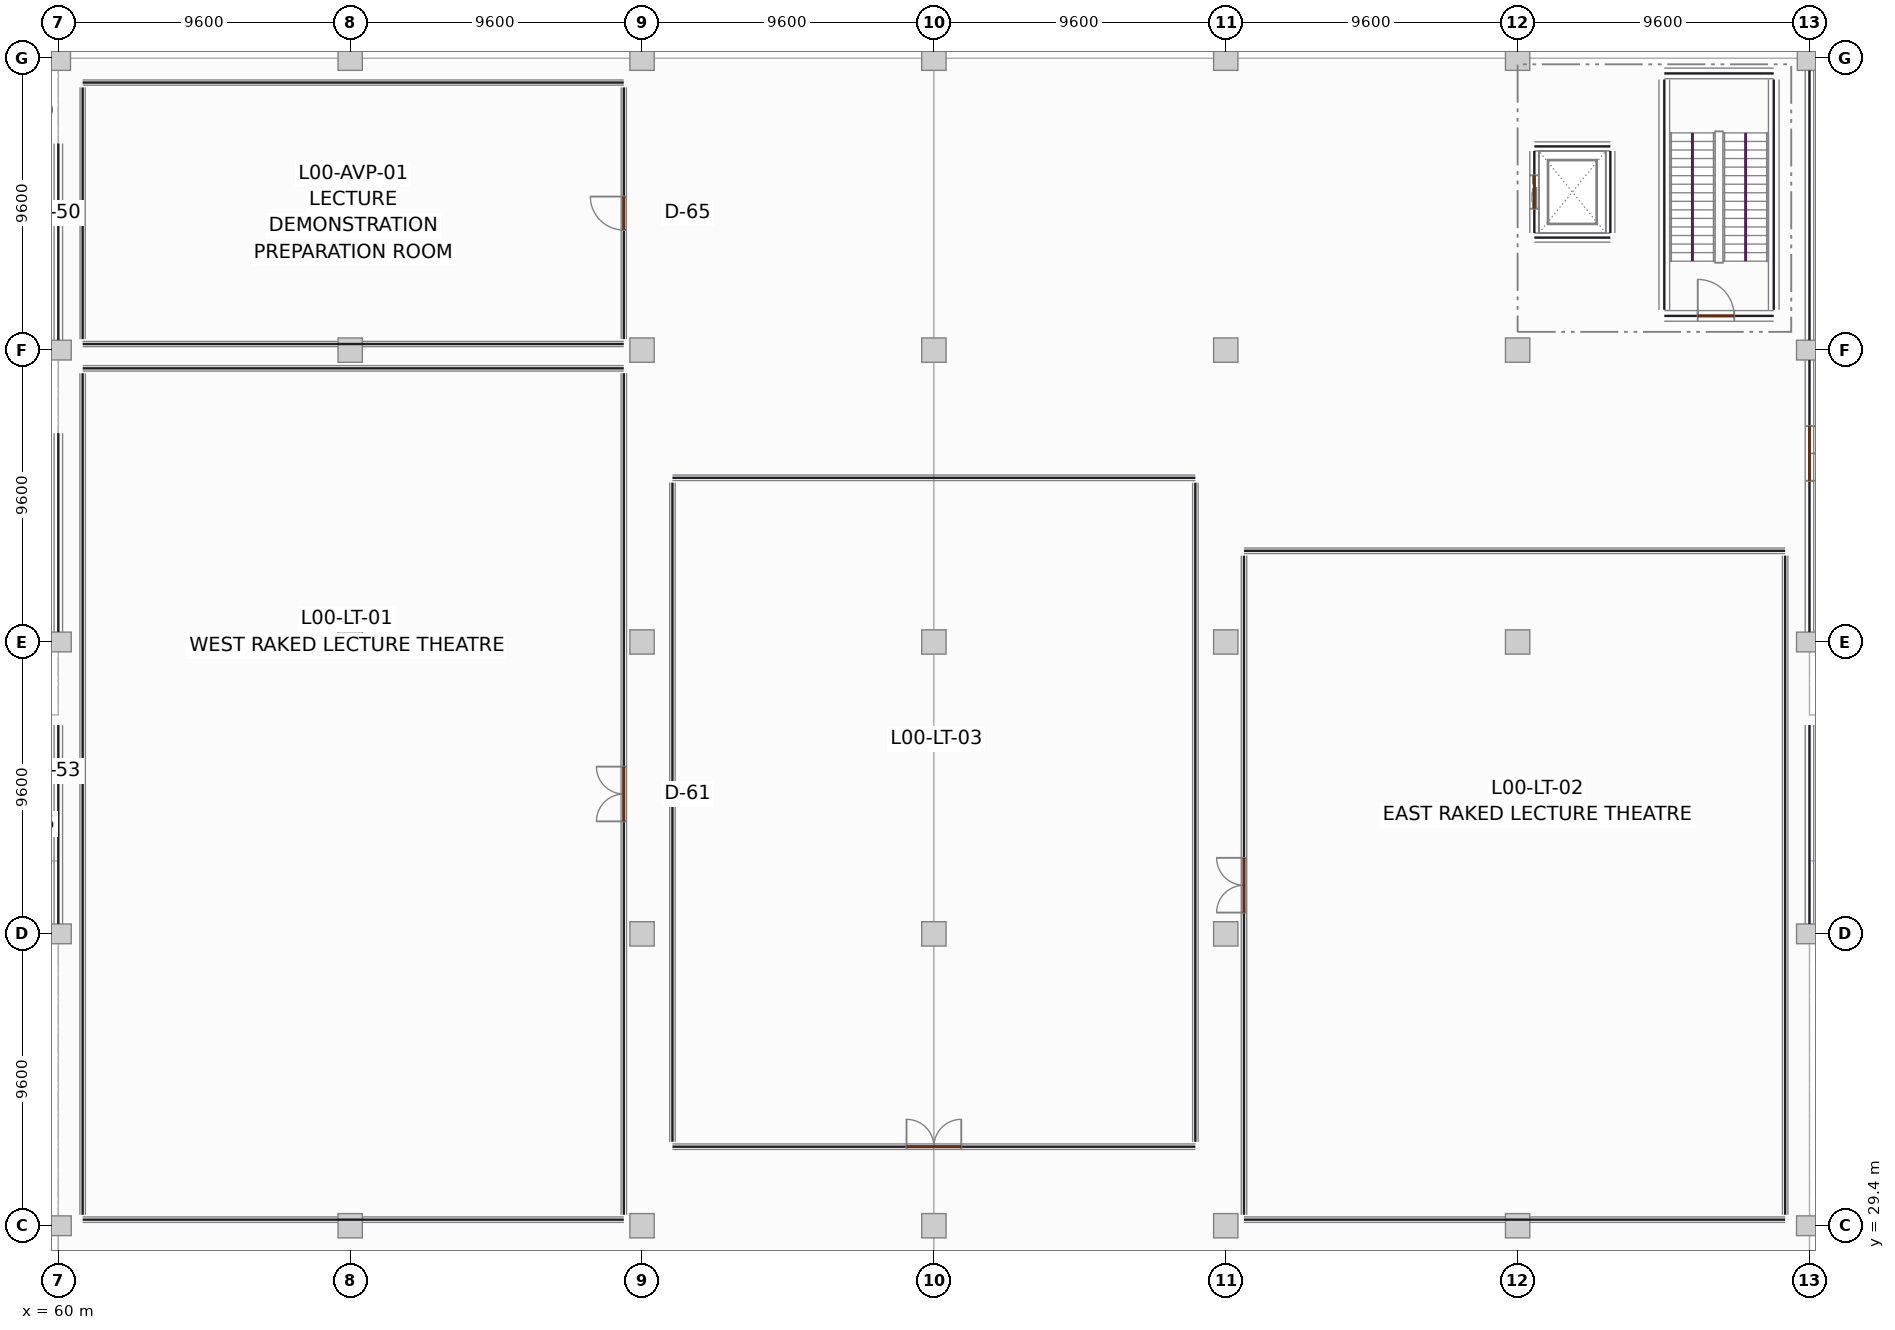
"""IFC4 building model, lengths in metres.
Left out: names, types, materials, properties, quantities, classifications, styles, units other than length and angle.
Written with IfcOpenShell. Run it as: python <this file> out.ifc"""

import sys

from ifc_helpers import new_model, si_unit, direction, frame, frame_2d, origin, origin_2d, place, context, subcontext, project, spatial, rectangle, extrude, element, fill, save


model = new_model("IFC4")
c1 = context("Model", 3, precision=1e-05, world=origin(), true_north=direction((0.0, 1.0)))
c2 = subcontext(c1, "Body", "Model", "MODEL_VIEW")
j1 = project(units=[si_unit("LENGTHUNIT", "METRE"), si_unit("PLANEANGLEUNIT", "RADIAN")], contexts=[c1])
p1 = place(None, origin())
s1 = spatial("IfcSite", under=j1, at=p1, CompositionType="ELEMENT")
p2 = place(p1, origin())
s2 = spatial("IfcBuilding", under=s1, at=p2, CompositionType="ELEMENT")
p3 = place(p2, origin())
s3 = spatial("IfcBuildingStorey", under=s2, at=p3, CompositionType="ELEMENT", Elevation=0.0)
for number, where, z_axis, x_axis in (
    (1, (60.0, 29.4, 0.0), (0.0, 0.0, 1.0), (1.0, 0.0, 0.0)),
    (2, (60.0, 39.0, 0.0), (0.0, 0.0, 1.0), (1.0, 0.0, 0.0)),
    (3, (60.0, 48.6, 0.0), (0.0, 0.0, 1.0), (1.0, 0.0, 0.0)),
    (4, (60.0, 58.2, 0.0), (0.0, 0.0, 1.0), (1.0, 0.0, 0.0)),
):
    element("IfcColumn", number, at=place(p3, frame(where, z_axis=z_axis, x_axis=x_axis)), inside=s3, PredefinedType="COLUMN", context=c2, shape_type="SweptSolid", body=[
        extrude(rectangle(XDim=0.85, YDim=0.65, at=origin_2d()), origin(), (0.0, 0.0, 1.0), 5.08),
    ])
for number, where, z_axis, x_axis in (
    (5, (60.0, 67.8, 0.0), (0.0, 0.0, 1.0), (1.0, 0.0, 0.0)),
    (6, (69.6, 29.4, 0.0), (0.0, 0.0, 1.0), (1.0, 0.0, 0.0)),
    (7, (69.6, 48.6, 0.0), (0.0, 0.0, 1.0), (1.0, 0.0, 0.0)),
    (8, (69.6, 58.2, 0.0), (0.0, 0.0, 1.0), (1.0, 0.0, 0.0)),
    (9, (69.6, 67.8, 0.0), (0.0, 0.0, 1.0), (1.0, 0.0, 0.0)),
    (10, (79.2, 29.4, 0.0), (0.0, 0.0, 1.0), (1.0, 0.0, 0.0)),
    (11, (79.2, 39.0, 0.0), (0.0, 0.0, 1.0), (1.0, 0.0, 0.0)),
    (12, (79.2, 48.6, 0.0), (0.0, 0.0, 1.0), (1.0, 0.0, 0.0)),
    (13, (79.2, 58.2, 0.0), (0.0, 0.0, 1.0), (1.0, 0.0, 0.0)),
    (14, (79.2, 67.8, 0.0), (0.0, 0.0, 1.0), (1.0, 0.0, 0.0)),
    (15, (88.8, 29.4, 0.0), (0.0, 0.0, 1.0), (1.0, 0.0, 0.0)),
    (16, (88.8, 39.0, 0.0), (0.0, 0.0, 1.0), (1.0, 0.0, 0.0)),
    (17, (88.8, 48.6, 0.0), (0.0, 0.0, 1.0), (1.0, 0.0, 0.0)),
    (18, (88.8, 58.2, 0.0), (0.0, 0.0, 1.0), (1.0, 0.0, 0.0)),
    (19, (88.8, 67.8, 0.0), (0.0, 0.0, 1.0), (1.0, 0.0, 0.0)),
    (20, (98.4, 29.4, 0.0), (0.0, 0.0, 1.0), (1.0, 0.0, 0.0)),
    (21, (98.4, 39.0, 0.0), (0.0, 0.0, 1.0), (1.0, 0.0, 0.0)),
    (22, (98.4, 48.6, 0.0), (0.0, 0.0, 1.0), (1.0, 0.0, 0.0)),
    (23, (98.4, 58.2, 0.0), (0.0, 0.0, 1.0), (1.0, 0.0, 0.0)),
    (24, (98.4, 67.8, 0.0), (0.0, 0.0, 1.0), (1.0, 0.0, 0.0)),
    (25, (108.0, 29.4, 0.0), (0.0, 0.0, 1.0), (1.0, 0.0, 0.0)),
    (26, (108.0, 48.6, 0.0), (0.0, 0.0, 1.0), (1.0, 0.0, 0.0)),
    (27, (108.0, 58.2, 0.0), (0.0, 0.0, 1.0), (1.0, 0.0, 0.0)),
    (28, (108.0, 67.8, 0.0), (0.0, 0.0, 1.0), (1.0, 0.0, 0.0)),
):
    element("IfcColumn", number, at=place(p3, frame(where, z_axis=z_axis, x_axis=x_axis)), inside=s3, PredefinedType="COLUMN", context=c2, shape_type="SweptSolid", body=[
        extrude(rectangle(XDim=0.8, YDim=0.8, at=origin_2d()), origin(), (0.0, 0.0, 1.0), 5.08),
    ])
for number, where, z_axis, x_axis in (
    (29, (117.6, 29.4, 0.0), (0.0, 0.0, 1.0), (1.0, 0.0, 0.0)),
    (30, (117.6, 39.0, 0.0), (0.0, 0.0, 1.0), (1.0, 0.0, 0.0)),
    (31, (117.6, 48.6, 0.0), (0.0, 0.0, 1.0), (1.0, 0.0, 0.0)),
    (32, (117.6, 58.2, 0.0), (0.0, 0.0, 1.0), (1.0, 0.0, 0.0)),
):
    element("IfcColumn", number, at=place(p3, frame(where, z_axis=z_axis, x_axis=x_axis)), inside=s3, PredefinedType="COLUMN", context=c2, shape_type="SweptSolid", body=[
        extrude(rectangle(XDim=0.85, YDim=0.65, at=origin_2d()), origin(), (0.0, 0.0, 1.0), 5.08),
    ])
p4 = place(p3, frame((117.6, 67.8, 0.0), z_axis=(0.0, 0.0, 1.0), x_axis=(1.0, 0.0, 0.0)))
e33 = element("IfcColumn", 33, at=p4, inside=s3, PredefinedType="COLUMN", context=c2, shape_type="SweptSolid", body=[
    extrude(rectangle(XDim=0.8, YDim=0.8, at=origin_2d()), origin(), (0.0, 0.0, 1.0), 5.08),
])
p5 = place(p3, frame((117.6, 39.327, 0.0), z_axis=(0.0, 0.0, 1.0), x_axis=(0.0, 1.0, 0.0)))
e34 = element("IfcWall", 34, at=p5, inside=s3, PredefinedType="SOLIDWALL", context=c2, shape_type="SweptSolid", body=[
    extrude(rectangle(XDim=6.542, YDim=0.28, at=frame_2d((3.271, 0.0))), origin(), (0.0, 0.0, 1.0), 4.28),
])
p6 = place(p3, frame((117.6, 48.927, 0.0), z_axis=(0.0, 0.0, 1.0), x_axis=(0.0, 1.0, 0.0)))
e35 = element("IfcWall", 35, at=p6, inside=s3, PredefinedType="SOLIDWALL", context=c2, shape_type="SweptSolid", body=[
    extrude(rectangle(XDim=8.946, YDim=0.28, at=frame_2d((4.473, 0.0))), origin(), (0.0, 0.0, 1.0), 4.28),
])
p7 = place(p6, frame((4.973, 0.0, 0.0)))
e36 = element("IfcOpeningElement", 36, at=p7, cuts=e35, PredefinedType="OPENING", context=c2, shape_type="SweptSolid", body=[
    extrude(rectangle(XDim=1.8, YDim=2.3, at=frame_2d((0.9, 1.15))), frame((0.0, 0.15, 0.0), z_axis=(0.0, -1.0, 0.0), x_axis=(1.0, 0.0, 0.0)), (0.0, 0.0, 1.0), 0.3),
])
p8 = place(p3, frame((117.6, 58.527, 0.0), z_axis=(0.0, 0.0, 1.0), x_axis=(0.0, 1.0, 0.0)))
e37 = element("IfcWall", 37, at=p8, inside=s3, PredefinedType="SOLIDWALL", context=c2, shape_type="SweptSolid", body=[
    extrude(rectangle(XDim=8.871, YDim=0.28, at=frame_2d((4.436, 0.0))), origin(), (0.0, 0.0, 1.0), 4.28),
])
for number, where, z_axis, x_axis in (
    (38, (60.0, 39.327, 0.0), (0.0, 0.0, 1.0), (0.0, 1.0, 0.0)),
    (39, (60.0, 48.927, 0.0), (0.0, 0.0, 1.0), (0.0, 1.0, 0.0)),
):
    element("IfcWall", number, at=place(p3, frame(where, z_axis=z_axis, x_axis=x_axis)), inside=s3, PredefinedType="SOLIDWALL", context=c2, shape_type="SweptSolid", body=[
        extrude(rectangle(XDim=6.542, YDim=0.28, at=frame_2d((3.271, 0.0))), origin(), (0.0, 0.0, 1.0), 4.28),
    ])
p9 = place(p3, frame((60.0, 58.527, 0.0), z_axis=(0.0, 0.0, 1.0), x_axis=(0.0, 1.0, 0.0)))
e40 = element("IfcWall", 40, at=p9, inside=s3, PredefinedType="SOLIDWALL", context=c2, shape_type="SweptSolid", body=[
    extrude(rectangle(XDim=6.467, YDim=0.28, at=frame_2d((3.233, 0.0))), origin(), (0.0, 0.0, 1.0), 4.28),
])
p10 = place(p3, frame((112.825, 59.325, 0.0), z_axis=(0.0, 0.0, 1.0), x_axis=(1.0, 0.0, 0.0)))
e41 = element("IfcWall", 41, at=p10, inside=s3, PredefinedType="SHEAR", context=c2, shape_type="SweptSolid", body=[
    extrude(rectangle(XDim=3.6, YDim=0.35, at=frame_2d((1.8, 0.0))), origin(), (0.0, 0.0, 1.0), 5.08),
])
p11 = place(p10, frame((1.1, 0.0, 0.0)))
e42 = element("IfcOpeningElement", 42, at=p11, cuts=e41, PredefinedType="OPENING", context=c2, shape_type="SweptSolid", body=[
    extrude(rectangle(XDim=1.2, YDim=2.2, at=frame_2d((0.6, 1.1))), frame((0.0, 0.185, 0.0), z_axis=(0.0, -1.0, 0.0), x_axis=(1.0, 0.0, 0.0)), (0.0, 0.0, 1.0), 0.37),
])
for number, where, z_axis, x_axis in (
    (43, (112.825, 59.525, 0.0), (0.0, 0.0, 1.0), (0.0, 1.0, 0.0)),
    (44, (116.425, 59.525, 0.0), (0.0, 0.0, 1.0), (0.0, 1.0, 0.0)),
):
    element("IfcWall", number, at=place(p3, frame(where, z_axis=z_axis, x_axis=x_axis)), inside=s3, PredefinedType="SHEAR", context=c2, shape_type="SweptSolid", body=[
        extrude(rectangle(XDim=7.575, YDim=0.35, at=frame_2d((3.788, 0.0))), origin(), (0.0, 0.0, 1.0), 5.08),
    ])
p12 = place(p3, frame((112.825, 67.3, 0.0), z_axis=(0.0, 0.0, 1.0), x_axis=(1.0, 0.0, 0.0)))
e45 = element("IfcWall", 45, at=p12, inside=s3, PredefinedType="SHEAR", context=c2, shape_type="SweptSolid", body=[
    extrude(rectangle(XDim=3.6, YDim=0.35, at=frame_2d((1.8, 0.0))), origin(), (0.0, 0.0, 1.0), 5.08),
])
for number, where, z_axis, x_axis in (
    (46, (108.55, 61.9, 0.0), (0.0, 0.0, 1.0), (1.0, 0.0, 0.0)),
    (47, (108.55, 64.9, 0.0), (0.0, 0.0, 1.0), (1.0, 0.0, 0.0)),
):
    element("IfcWall", number, at=place(p3, frame(where, z_axis=z_axis, x_axis=x_axis)), inside=s3, PredefinedType="SHEAR", context=c2, shape_type="SweptSolid", body=[
        extrude(rectangle(XDim=2.5, YDim=0.3, at=frame_2d((1.25, 0.0))), origin(), (0.0, 0.0, 1.0), 5.08),
    ])
p13 = place(p3, frame((108.55, 62.05, 0.0), z_axis=(0.0, 0.0, 1.0), x_axis=(0.0, 1.0, 0.0)))
e48 = element("IfcWall", 48, at=p13, inside=s3, PredefinedType="SHEAR", context=c2, shape_type="SweptSolid", body=[
    extrude(rectangle(XDim=2.7, YDim=0.3, at=frame_2d((1.35, 0.0))), origin(), (0.0, 0.0, 1.0), 5.08),
])
p14 = place(p13, frame((0.8, 0.0, 0.0)))
e49 = element("IfcOpeningElement", 49, at=p14, cuts=e48, PredefinedType="OPENING", context=c2, shape_type="SweptSolid", body=[
    extrude(rectangle(XDim=1.1, YDim=2.2, at=frame_2d((0.55, 1.1))), frame((0.0, 0.16, 0.0), z_axis=(0.0, -1.0, 0.0), x_axis=(1.0, 0.0, 0.0)), (0.0, 0.0, 1.0), 0.32),
])
p15 = place(p3, frame((111.05, 62.05, 0.0), z_axis=(0.0, 0.0, 1.0), x_axis=(0.0, 1.0, 0.0)))
e50 = element("IfcWall", 50, at=p15, inside=s3, PredefinedType="SHEAR", context=c2, shape_type="SweptSolid", body=[
    extrude(rectangle(XDim=2.7, YDim=0.3, at=frame_2d((1.35, 0.0))), origin(), (0.0, 0.0, 1.0), 5.08),
])
for number, where, z_axis, x_axis in (
    (51, (60.8, 29.6, 0.0), (0.0, 0.0, 1.0), (1.0, 0.0, 0.0)),
    (52, (60.8, 57.6, 0.0), (0.0, 0.0, 1.0), (1.0, 0.0, 0.0)),
):
    element("IfcWall", number, at=place(p3, frame(where, z_axis=z_axis, x_axis=x_axis)), inside=s3, PredefinedType="PARTITIONING", context=c2, shape_type="SweptSolid", body=[
        extrude(rectangle(XDim=17.8, YDim=0.18, at=frame_2d((8.9, 0.0))), origin(), (0.0, 0.0, 1.0), 4.12),
    ])
p16 = place(p3, frame((60.8, 29.76, 0.0), z_axis=(0.0, 0.0, 1.0), x_axis=(0.0, 1.0, 0.0)))
e53 = element("IfcWall", 53, at=p16, inside=s3, PredefinedType="PARTITIONING", context=c2, shape_type="SweptSolid", body=[
    extrude(rectangle(XDim=27.68, YDim=0.18, at=frame_2d((13.84, 0.0))), origin(), (0.0, 0.0, 1.0), 4.12),
])
p17 = place(p3, frame((78.6, 29.76, 0.0), z_axis=(0.0, 0.0, 1.0), x_axis=(0.0, 1.0, 0.0)))
e54 = element("IfcWall", 54, at=p17, inside=s3, PredefinedType="PARTITIONING", context=c2, shape_type="SweptSolid", body=[
    extrude(rectangle(XDim=27.68, YDim=0.18, at=frame_2d((13.84, 0.0))), origin(), (0.0, 0.0, 1.0), 4.12),
])
p18 = place(p17, frame((12.94, 0.0, 0.0)))
e55 = element("IfcOpeningElement", 55, at=p18, cuts=e54, PredefinedType="OPENING", context=c2, shape_type="SweptSolid", body=[
    extrude(rectangle(XDim=1.8, YDim=2.4, at=frame_2d((0.9, 1.2))), frame((0.0, 0.1, 0.0), z_axis=(0.0, -1.0, 0.0), x_axis=(1.0, 0.0, 0.0)), (0.0, 0.0, 1.0), 0.2),
])
for number, where, z_axis, x_axis in (
    (56, (99.0, 29.6, 0.0), (0.0, 0.0, 1.0), (1.0, 0.0, 0.0)),
    (57, (99.0, 51.6, 0.0), (0.0, 0.0, 1.0), (1.0, 0.0, 0.0)),
):
    element("IfcWall", number, at=place(p3, frame(where, z_axis=z_axis, x_axis=x_axis)), inside=s3, PredefinedType="PARTITIONING", context=c2, shape_type="SweptSolid", body=[
        extrude(rectangle(XDim=17.8, YDim=0.18, at=frame_2d((8.9, 0.0))), origin(), (0.0, 0.0, 1.0), 4.12),
    ])
p19 = place(p3, frame((99.0, 29.76, 0.0), z_axis=(0.0, 0.0, 1.0), x_axis=(0.0, 1.0, 0.0)))
e58 = element("IfcWall", 58, at=p19, inside=s3, PredefinedType="PARTITIONING", context=c2, shape_type="SweptSolid", body=[
    extrude(rectangle(XDim=21.68, YDim=0.18, at=frame_2d((10.84, 0.0))), origin(), (0.0, 0.0, 1.0), 4.12),
])
p20 = place(p19, frame((9.94, 0.0, 0.0)))
e59 = element("IfcOpeningElement", 59, at=p20, cuts=e58, PredefinedType="OPENING", context=c2, shape_type="SweptSolid", body=[
    extrude(rectangle(XDim=1.8, YDim=2.4, at=frame_2d((0.9, 1.2))), frame((0.0, 0.1, 0.0), z_axis=(0.0, -1.0, 0.0), x_axis=(1.0, 0.0, 0.0)), (0.0, 0.0, 1.0), 0.2),
])
p21 = place(p3, frame((116.8, 29.76, 0.0), z_axis=(0.0, 0.0, 1.0), x_axis=(0.0, 1.0, 0.0)))
e60 = element("IfcWall", 60, at=p21, inside=s3, PredefinedType="PARTITIONING", context=c2, shape_type="SweptSolid", body=[
    extrude(rectangle(XDim=21.68, YDim=0.18, at=frame_2d((10.84, 0.0))), origin(), (0.0, 0.0, 1.0), 4.12),
])
p22 = place(p3, frame((80.2, 32.0, 0.0), z_axis=(0.0, 0.0, 1.0), x_axis=(1.0, 0.0, 0.0)))
e61 = element("IfcWall", 61, at=p22, inside=s3, PredefinedType="PARTITIONING", context=c2, shape_type="SweptSolid", body=[
    extrude(rectangle(XDim=17.2, YDim=0.18, at=frame_2d((8.6, 0.0))), origin(), (0.0, 0.0, 1.0), 4.12),
])
p23 = place(p22, frame((7.7, 0.0, 0.0)))
e62 = element("IfcOpeningElement", 62, at=p23, cuts=e61, PredefinedType="OPENING", context=c2, shape_type="SweptSolid", body=[
    extrude(rectangle(XDim=1.8, YDim=2.4, at=frame_2d((0.9, 1.2))), frame((0.0, 0.1, 0.0), z_axis=(0.0, -1.0, 0.0), x_axis=(1.0, 0.0, 0.0)), (0.0, 0.0, 1.0), 0.2),
])
p24 = place(p3, frame((80.2, 54.0, 0.0), z_axis=(0.0, 0.0, 1.0), x_axis=(1.0, 0.0, 0.0)))
e63 = element("IfcWall", 63, at=p24, inside=s3, PredefinedType="PARTITIONING", context=c2, shape_type="SweptSolid", body=[
    extrude(rectangle(XDim=17.2, YDim=0.18, at=frame_2d((8.6, 0.0))), origin(), (0.0, 0.0, 1.0), 4.12),
])
for number, where, z_axis, x_axis in (
    (64, (80.2, 32.16, 0.0), (0.0, 0.0, 1.0), (0.0, 1.0, 0.0)),
    (65, (97.4, 32.16, 0.0), (0.0, 0.0, 1.0), (0.0, 1.0, 0.0)),
):
    element("IfcWall", number, at=place(p3, frame(where, z_axis=z_axis, x_axis=x_axis)), inside=s3, PredefinedType="PARTITIONING", context=c2, shape_type="SweptSolid", body=[
        extrude(rectangle(XDim=21.68, YDim=0.18, at=frame_2d((10.84, 0.0))), origin(), (0.0, 0.0, 1.0), 4.12),
    ])
for number, where, z_axis, x_axis in (
    (66, (60.8, 58.4, 0.0), (0.0, 0.0, 1.0), (1.0, 0.0, 0.0)),
    (67, (60.8, 67.0, 0.0), (0.0, 0.0, 1.0), (1.0, 0.0, 0.0)),
):
    element("IfcWall", number, at=place(p3, frame(where, z_axis=z_axis, x_axis=x_axis)), inside=s3, PredefinedType="PARTITIONING", context=c2, shape_type="SweptSolid", body=[
        extrude(rectangle(XDim=17.8, YDim=0.17, at=frame_2d((8.9, 0.0))), origin(), (0.0, 0.0, 1.0), 4.12),
    ])
p25 = place(p3, frame((60.8, 58.56, 0.0), z_axis=(0.0, 0.0, 1.0), x_axis=(0.0, 1.0, 0.0)))
e68 = element("IfcWall", 68, at=p25, inside=s3, PredefinedType="PARTITIONING", context=c2, shape_type="SweptSolid", body=[
    extrude(rectangle(XDim=8.28, YDim=0.17, at=frame_2d((4.14, 0.0))), origin(), (0.0, 0.0, 1.0), 4.12),
])
p26 = place(p3, frame((78.6, 58.56, 0.0), z_axis=(0.0, 0.0, 1.0), x_axis=(0.0, 1.0, 0.0)))
e69 = element("IfcWall", 69, at=p26, inside=s3, PredefinedType="PARTITIONING", context=c2, shape_type="SweptSolid", body=[
    extrude(rectangle(XDim=8.28, YDim=0.17, at=frame_2d((4.14, 0.0))), origin(), (0.0, 0.0, 1.0), 4.12),
])
p27 = place(p26, frame((3.59, 0.0, 0.0)))
e70 = element("IfcOpeningElement", 70, at=p27, cuts=e69, PredefinedType="OPENING", context=c2, shape_type="SweptSolid", body=[
    extrude(rectangle(XDim=1.1, YDim=2.2, at=frame_2d((0.55, 1.1))), frame((0.0, 0.095, 0.0), z_axis=(0.0, -1.0, 0.0), x_axis=(1.0, 0.0, 0.0)), (0.0, 0.0, 1.0), 0.19),
])
p28 = place(p7, frame((1.8, 0.0, 0.0), z_axis=(0.0, 0.0, 1.0), x_axis=(-1.0, 0.0, 0.0)))
e71 = element("IfcDoor", 71, at=p28, inside=s3, OperationType="DOUBLE_DOOR_SINGLE_SWING", PredefinedType="DOOR", context=c2, shape_type="SweptSolid", body=[
    extrude(rectangle(XDim=1.8, YDim=2.3, at=frame_2d((0.9, 1.15))), frame((0.0, 0.025, 0.0), z_axis=(0.0, -1.0, 0.0), x_axis=(1.0, 0.0, 0.0)), (0.0, 0.0, 1.0), 0.05),
])
fill(e36, e71)
p29 = place(p11, origin())
e72 = element("IfcDoor", 72, at=p29, inside=s3, OperationType="SINGLE_SWING_LEFT", PredefinedType="DOOR", context=c2, shape_type="SweptSolid", body=[
    extrude(rectangle(XDim=1.2, YDim=2.2, at=frame_2d((0.6, 1.1))), frame((0.0, 0.025, 0.0), z_axis=(0.0, -1.0, 0.0), x_axis=(1.0, 0.0, 0.0)), (0.0, 0.0, 1.0), 0.05),
])
fill(e42, e72)
p30 = place(p14, origin())
e73 = element("IfcDoor", 73, at=p30, inside=s3, OperationType="SLIDING_TO_LEFT", PredefinedType="DOOR", context=c2, shape_type="SweptSolid", body=[
    extrude(rectangle(XDim=1.1, YDim=2.2, at=frame_2d((0.55, 1.1))), frame((0.0, 0.025, 0.0), z_axis=(0.0, -1.0, 0.0), x_axis=(1.0, 0.0, 0.0)), (0.0, 0.0, 1.0), 0.05),
])
fill(e49, e73)
p31 = place(p18, origin())
e74 = element("IfcDoor", 74, at=p31, inside=s3, OperationType="DOUBLE_DOOR_SINGLE_SWING", PredefinedType="DOOR", context=c2, shape_type="SweptSolid", body=[
    extrude(rectangle(XDim=1.8, YDim=2.4, at=frame_2d((0.9, 1.2))), frame((0.0, 0.025, 0.0), z_axis=(0.0, -1.0, 0.0), x_axis=(1.0, 0.0, 0.0)), (0.0, 0.0, 1.0), 0.05),
])
fill(e55, e74)
p32 = place(p20, origin())
e75 = element("IfcDoor", 75, at=p32, inside=s3, OperationType="DOUBLE_DOOR_SINGLE_SWING", PredefinedType="DOOR", context=c2, shape_type="SweptSolid", body=[
    extrude(rectangle(XDim=1.8, YDim=2.4, at=frame_2d((0.9, 1.2))), frame((0.0, 0.025, 0.0), z_axis=(0.0, -1.0, 0.0), x_axis=(1.0, 0.0, 0.0)), (0.0, 0.0, 1.0), 0.05),
])
fill(e59, e75)
p33 = place(p23, origin())
e76 = element("IfcDoor", 76, at=p33, inside=s3, OperationType="DOUBLE_DOOR_SINGLE_SWING", PredefinedType="DOOR", context=c2, shape_type="SweptSolid", body=[
    extrude(rectangle(XDim=1.8, YDim=2.4, at=frame_2d((0.9, 1.2))), frame((0.0, 0.025, 0.0), z_axis=(0.0, -1.0, 0.0), x_axis=(1.0, 0.0, 0.0)), (0.0, 0.0, 1.0), 0.05),
])
fill(e62, e76)
p34 = place(p27, origin())
e77 = element("IfcDoor", 77, at=p34, inside=s3, OperationType="SINGLE_SWING_RIGHT", PredefinedType="DOOR", context=c2, shape_type="SweptSolid", body=[
    extrude(rectangle(XDim=1.1, YDim=2.2, at=frame_2d((0.55, 1.1))), frame((0.0, 0.025, 0.0), z_axis=(0.0, -1.0, 0.0), x_axis=(1.0, 0.0, 0.0)), (0.0, 0.0, 1.0), 0.05),
])
fill(e70, e77)
save(model, sys.argv[1])
